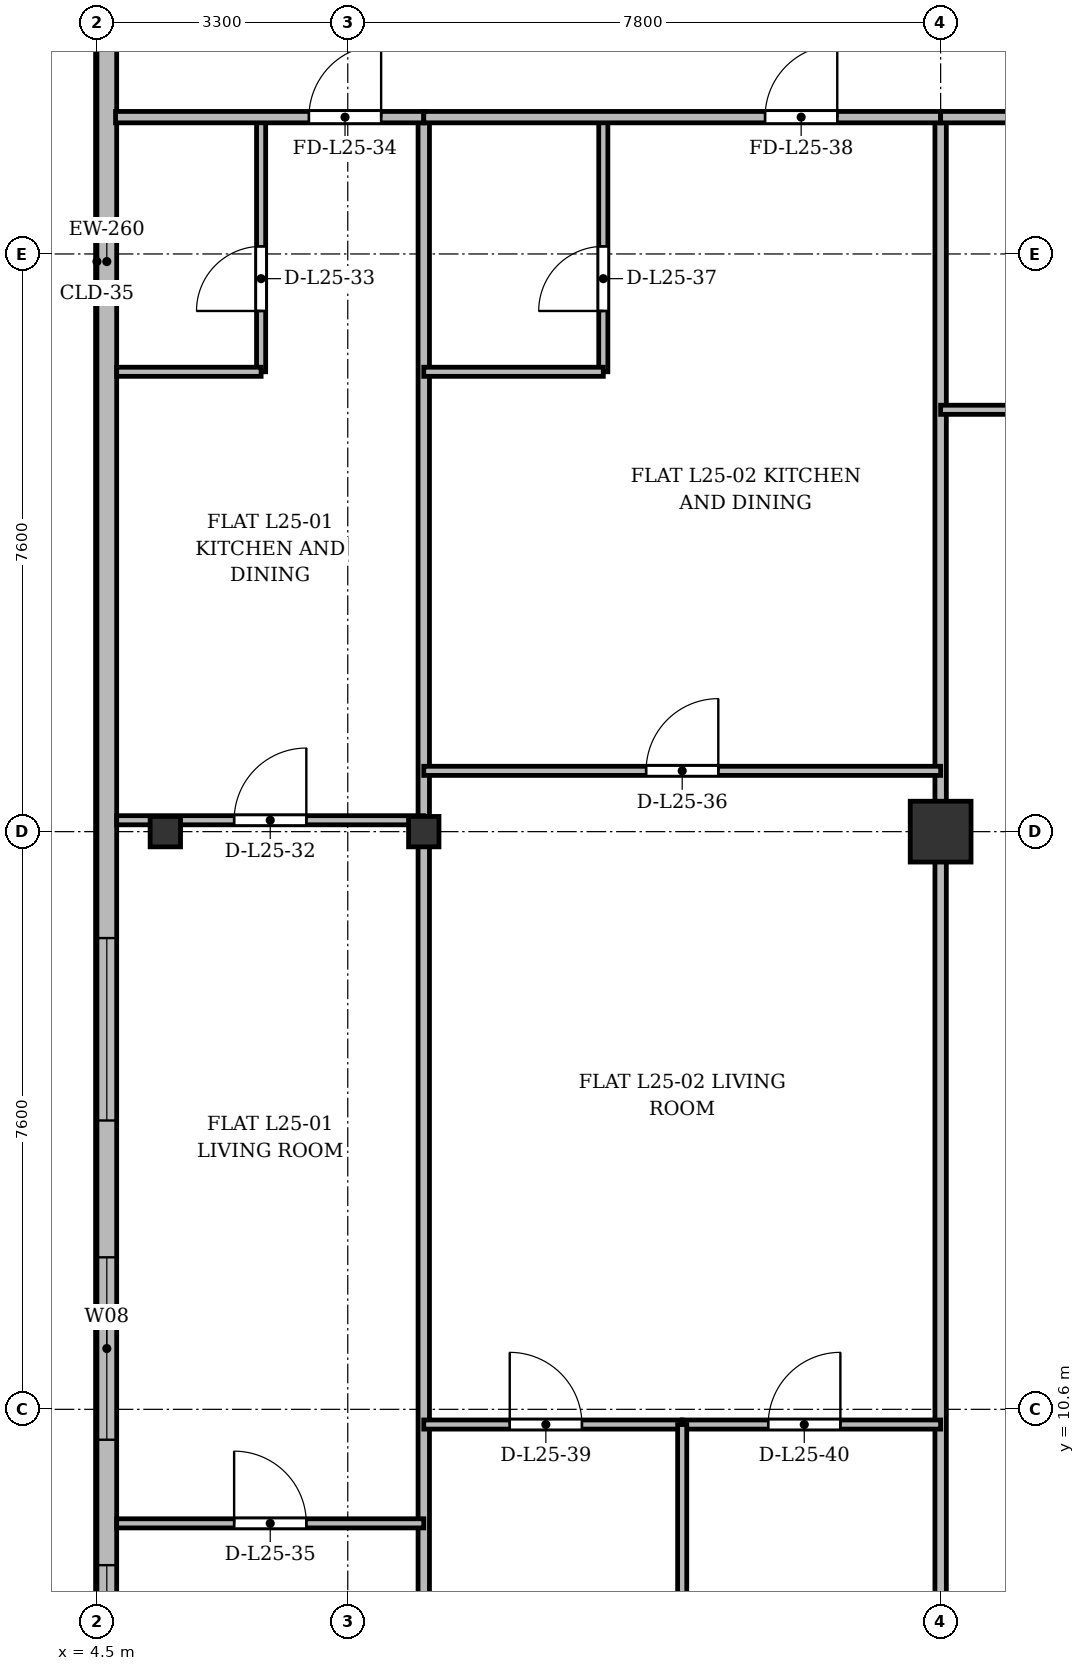
"""IFC4 building model, lengths in metres.
Left out: names, types, materials, properties, quantities, classifications, styles, units other than length and angle.
Written with IfcOpenShell. Run it as: python <this file> out.ifc"""

import sys

from ifc_helpers import new_model, si_unit, direction, frame, frame_2d, origin, origin_2d, place, context, subcontext, project, spatial, rectangle, i_section, extrude, source, transform, mapped, element, fill, save


model = new_model("IFC4")
c1 = context("Model", 3, precision=1e-05, world=origin(), true_north=direction((0.0, 1.0)))
c2 = subcontext(c1, "Body", "Model", "MODEL_VIEW")
j1 = project(units=[si_unit("LENGTHUNIT", "METRE"), si_unit("PLANEANGLEUNIT", "RADIAN")], contexts=[c1])
p1 = place(None, origin())
s1 = spatial("IfcSite", under=j1, at=p1, CompositionType="ELEMENT")
p2 = place(p1, origin())
s2 = spatial("IfcBuilding", under=s1, at=p2, CompositionType="ELEMENT")
p3 = place(p2, frame((0.0, 0.0, 99.7)))
s3 = spatial("IfcBuildingStorey", under=s2, at=p3, CompositionType="ELEMENT", Elevation=99.7)
m1 = source(origin(), c2, "Body", "SweptSolid", [
    extrude(i_section(OverallWidth=0.4, OverallDepth=0.4, WebThickness=0.022, FlangeThickness=0.035, at=origin_2d()), origin(), (0.0, 0.0, 1.0), 3.6),
])
for number, where, z_axis, x_axis in (
    (1, (5.4, 18.2, 0.0), (0.0, 0.0, 1.0), (1.0, 0.0, 0.0)),
    (2, (8.8, 18.2, 0.0), (0.0, 0.0, 1.0), (1.0, 0.0, 0.0)),
):
    element("IfcColumn", number, at=place(p3, frame(where, z_axis=z_axis, x_axis=x_axis)), inside=s3, PredefinedType="COLUMN", context=c2, shape_type="MappedRepresentation", body=[
        mapped(m1, transform((0.0, 0.0, 0.0), x_axis=(1.0, 0.0, 0.0), y_axis=(0.0, 1.0, 0.0), z_axis=(0.0, 0.0, 1.0), scale=1.0)),
    ])
m2 = source(origin(), c2, "Body", "SweptSolid", [
    extrude(rectangle(XDim=0.8, YDim=0.8, at=origin_2d()), origin(), (0.0, 0.0, 1.0), 3.6),
])
p4 = place(p3, frame((15.6, 18.2, 0.0), z_axis=(0.0, 0.0, 1.0), x_axis=(1.0, 0.0, 0.0)))
e3 = element("IfcColumn", 3, at=p4, inside=s3, PredefinedType="COLUMN", context=c2, shape_type="MappedRepresentation", body=[
    mapped(m2, transform((0.0, 0.0, 0.0), x_axis=(1.0, 0.0, 0.0), y_axis=(0.0, 1.0, 0.0), z_axis=(0.0, 0.0, 1.0), scale=1.0)),
])
p5 = place(p3, frame((4.63, 5.9, 0.0), z_axis=(0.0, 0.0, 1.0), x_axis=(0.0, 1.0, 0.0)))
e4 = element("IfcWall", 4, at=p5, inside=s3, PredefinedType="SOLIDWALL", context=c2, shape_type="SweptSolid", body=[
    extrude(rectangle(XDim=39.6, YDim=0.26, at=frame_2d((19.8, 0.0))), origin(), (0.0, 0.0, 1.0), 3.34),
])
p6 = place(p5, frame((1.45, 0.0, 0.92)))
e5 = element("IfcOpeningElement", 5, at=p6, cuts=e4, PredefinedType="OPENING", context=c2, shape_type="SweptSolid", body=[
    extrude(rectangle(XDim=1.2, YDim=1.65, at=frame_2d((0.6, 0.825))), frame((0.0, 0.14, 0.0), z_axis=(0.0, -1.0, 0.0), x_axis=(1.0, 0.0, 0.0)), (0.0, 0.0, 1.0), 0.28),
])
p7 = place(p5, frame((4.3, 0.0, 0.92)))
e6 = element("IfcOpeningElement", 6, at=p7, cuts=e4, PredefinedType="OPENING", context=c2, shape_type="SweptSolid", body=[
    extrude(rectangle(XDim=2.4, YDim=2.1, at=frame_2d((1.2, 1.05))), frame((0.0, 0.14, 0.0), z_axis=(0.0, -1.0, 0.0), x_axis=(1.0, 0.0, 0.0)), (0.0, 0.0, 1.0), 0.28),
])
p8 = place(p5, frame((8.5, 0.0, 0.92)))
e7 = element("IfcOpeningElement", 7, at=p8, cuts=e4, PredefinedType="OPENING", context=c2, shape_type="SweptSolid", body=[
    extrude(rectangle(XDim=2.4, YDim=2.1, at=frame_2d((1.2, 1.05))), frame((0.0, 0.14, 0.0), z_axis=(0.0, -1.0, 0.0), x_axis=(1.0, 0.0, 0.0)), (0.0, 0.0, 1.0), 0.28),
])
p9 = place(p5, frame((33.9, 0.0, 0.92)))
e8 = element("IfcOpeningElement", 8, at=p9, cuts=e4, PredefinedType="OPENING", context=c2, shape_type="SweptSolid", body=[
    extrude(rectangle(XDim=1.2, YDim=1.65, at=frame_2d((0.6, 0.825))), frame((0.0, 0.14, 0.0), z_axis=(0.0, -1.0, 0.0), x_axis=(1.0, 0.0, 0.0)), (0.0, 0.0, 1.0), 0.28),
])
p10 = place(p5, frame((37.25, 0.0, 0.92)))
e9 = element("IfcOpeningElement", 9, at=p10, cuts=e4, PredefinedType="OPENING", context=c2, shape_type="SweptSolid", body=[
    extrude(rectangle(XDim=1.2, YDim=1.65, at=frame_2d((0.6, 0.825))), frame((0.0, 0.14, 0.0), z_axis=(0.0, -1.0, 0.0), x_axis=(1.0, 0.0, 0.0)), (0.0, 0.0, 1.0), 0.28),
])
for number, where, z_axis, x_axis in (
    (10, (8.8, 3.145, 0.0), (0.0, 0.0, 1.0), (0.0, 1.0, 0.0)),
    (11, (15.6, 3.145, 0.0), (0.0, 0.0, 1.0), (0.0, 1.0, 0.0)),
):
    element("IfcWall", number, at=place(p3, frame(where, z_axis=z_axis, x_axis=x_axis)), inside=s3, PredefinedType="PARTITIONING", context=c2, shape_type="SweptSolid", body=[
        extrude(rectangle(XDim=24.455, YDim=0.15, at=frame_2d((12.228, 0.0))), origin(), (0.0, 0.0, 1.0), 2.84),
    ])
p11 = place(p3, frame((4.76, 18.35, 0.0), z_axis=(0.0, 0.0, 1.0), x_axis=(1.0, 0.0, 0.0)))
e12 = element("IfcWall", 12, at=p11, inside=s3, PredefinedType="PARTITIONING", context=c2, shape_type="SweptSolid", body=[
    extrude(rectangle(XDim=4.04, YDim=0.12, at=frame_2d((2.02, 0.0))), origin(), (0.0, 0.0, 1.0), 2.752),
])
p12 = place(p11, frame((1.545, 0.0, 0.0)))
e13 = element("IfcOpeningElement", 13, at=p12, cuts=e12, PredefinedType="OPENING", context=c2, shape_type="SweptSolid", body=[
    extrude(rectangle(XDim=0.95, YDim=2.15, at=frame_2d((0.475, 1.075))), frame((0.0, 0.07, 0.0), z_axis=(0.0, -1.0, 0.0), x_axis=(1.0, 0.0, 0.0)), (0.0, 0.0, 1.0), 0.14),
])
p13 = place(p3, frame((6.66, 24.25, 0.0), z_axis=(0.0, 0.0, 1.0), x_axis=(0.0, 1.0, 0.0)))
e14 = element("IfcWall", 14, at=p13, inside=s3, PredefinedType="PARTITIONING", context=c2, shape_type="SweptSolid", body=[
    extrude(rectangle(XDim=3.35, YDim=0.12, at=frame_2d((1.675, 0.0))), origin(), (0.0, 0.0, 1.0), 2.99),
])
p14 = place(p13, frame((0.8, 0.0, 0.0)))
e15 = element("IfcOpeningElement", 15, at=p14, cuts=e14, PredefinedType="OPENING", context=c2, shape_type="SweptSolid", body=[
    extrude(rectangle(XDim=0.85, YDim=2.1, at=frame_2d((0.425, 1.05))), frame((0.0, 0.07, 0.0), z_axis=(0.0, -1.0, 0.0), x_axis=(1.0, 0.0, 0.0)), (0.0, 0.0, 1.0), 0.14),
])
p15 = place(p3, frame((4.76, 24.25, 0.0), z_axis=(0.0, 0.0, 1.0), x_axis=(1.0, 0.0, 0.0)))
e16 = element("IfcWall", 16, at=p15, inside=s3, PredefinedType="PARTITIONING", context=c2, shape_type="SweptSolid", body=[
    extrude(rectangle(XDim=1.9, YDim=0.12, at=frame_2d((0.95, 0.0))), origin(), (0.0, 0.0, 1.0), 2.84),
])
p16 = place(p3, frame((4.745, 27.6, 0.0), z_axis=(0.0, 0.0, 1.0), x_axis=(1.0, 0.0, 0.0)))
e17 = element("IfcWall", 17, at=p16, inside=s3, PredefinedType="PARTITIONING", context=c2, shape_type="SweptSolid", body=[
    extrude(rectangle(XDim=4.055, YDim=0.15, at=frame_2d((2.027, 0.0))), origin(), (0.0, 0.0, 1.0), 2.84),
])
p17 = place(p16, frame((2.544, 0.0, 0.0)))
e18 = element("IfcOpeningElement", 18, at=p17, cuts=e17, PredefinedType="OPENING", context=c2, shape_type="SweptSolid", body=[
    extrude(rectangle(XDim=0.95, YDim=2.15, at=frame_2d((0.475, 1.075))), frame((0.0, 0.085, 0.0), z_axis=(0.0, -1.0, 0.0), x_axis=(1.0, 0.0, 0.0)), (0.0, 0.0, 1.0), 0.17),
])
p18 = place(p3, frame((4.76, 9.1, 0.0), z_axis=(0.0, 0.0, 1.0), x_axis=(1.0, 0.0, 0.0)))
e19 = element("IfcWall", 19, at=p18, inside=s3, PredefinedType="PARTITIONING", context=c2, shape_type="SweptSolid", body=[
    extrude(rectangle(XDim=4.04, YDim=0.12, at=frame_2d((2.02, 0.0))), origin(), (0.0, 0.0, 1.0), 2.84),
])
p19 = place(p18, frame((1.545, 0.0, 0.0)))
e20 = element("IfcOpeningElement", 20, at=p19, cuts=e19, PredefinedType="OPENING", context=c2, shape_type="SweptSolid", body=[
    extrude(rectangle(XDim=0.95, YDim=2.15, at=frame_2d((0.475, 1.075))), frame((0.0, 0.07, 0.0), z_axis=(0.0, -1.0, 0.0), x_axis=(1.0, 0.0, 0.0)), (0.0, 0.0, 1.0), 0.14),
])
p20 = place(p3, frame((8.8, 19.0, 0.0), z_axis=(0.0, 0.0, 1.0), x_axis=(1.0, 0.0, 0.0)))
e21 = element("IfcWall", 21, at=p20, inside=s3, PredefinedType="PARTITIONING", context=c2, shape_type="SweptSolid", body=[
    extrude(rectangle(XDim=6.8, YDim=0.12, at=frame_2d((3.4, 0.0))), origin(), (0.0, 0.0, 1.0), 2.84),
])
p21 = place(p20, frame((2.925, 0.0, 0.0)))
e22 = element("IfcOpeningElement", 22, at=p21, cuts=e21, PredefinedType="OPENING", context=c2, shape_type="SweptSolid", body=[
    extrude(rectangle(XDim=0.95, YDim=2.15, at=frame_2d((0.475, 1.075))), frame((0.0, 0.07, 0.0), z_axis=(0.0, -1.0, 0.0), x_axis=(1.0, 0.0, 0.0)), (0.0, 0.0, 1.0), 0.14),
])
p22 = place(p3, frame((11.162, 24.25, 0.0), z_axis=(0.0, 0.0, 1.0), x_axis=(0.0, 1.0, 0.0)))
e23 = element("IfcWall", 23, at=p22, inside=s3, PredefinedType="PARTITIONING", context=c2, shape_type="SweptSolid", body=[
    extrude(rectangle(XDim=3.35, YDim=0.12, at=frame_2d((1.675, 0.0))), origin(), (0.0, 0.0, 1.0), 2.99),
])
p23 = place(p22, frame((0.8, 0.0, 0.0)))
e24 = element("IfcOpeningElement", 24, at=p23, cuts=e23, PredefinedType="OPENING", context=c2, shape_type="SweptSolid", body=[
    extrude(rectangle(XDim=0.85, YDim=2.1, at=frame_2d((0.425, 1.05))), frame((0.0, 0.07, 0.0), z_axis=(0.0, -1.0, 0.0), x_axis=(1.0, 0.0, 0.0)), (0.0, 0.0, 1.0), 0.14),
])
p24 = place(p3, frame((8.8, 24.25, 0.0), z_axis=(0.0, 0.0, 1.0), x_axis=(1.0, 0.0, 0.0)))
e25 = element("IfcWall", 25, at=p24, inside=s3, PredefinedType="PARTITIONING", context=c2, shape_type="SweptSolid", body=[
    extrude(rectangle(XDim=2.362, YDim=0.12, at=frame_2d((1.181, 0.0))), origin(), (0.0, 0.0, 1.0), 2.84),
])
p25 = place(p3, frame((8.8, 27.6, 0.0), z_axis=(0.0, 0.0, 1.0), x_axis=(1.0, 0.0, 0.0)))
e26 = element("IfcWall", 26, at=p25, inside=s3, PredefinedType="PARTITIONING", context=c2, shape_type="SweptSolid", body=[
    extrude(rectangle(XDim=6.8, YDim=0.15, at=frame_2d((3.4, 0.0))), origin(), (0.0, 0.0, 1.0), 2.84),
])
p26 = place(p25, frame((4.49, 0.0, 0.0)))
e27 = element("IfcOpeningElement", 27, at=p26, cuts=e26, PredefinedType="OPENING", context=c2, shape_type="SweptSolid", body=[
    extrude(rectangle(XDim=0.95, YDim=2.15, at=frame_2d((0.475, 1.075))), frame((0.0, 0.085, 0.0), z_axis=(0.0, -1.0, 0.0), x_axis=(1.0, 0.0, 0.0)), (0.0, 0.0, 1.0), 0.17),
])
p27 = place(p3, frame((8.8, 10.4, 0.0), z_axis=(0.0, 0.0, 1.0), x_axis=(1.0, 0.0, 0.0)))
e28 = element("IfcWall", 28, at=p27, inside=s3, PredefinedType="PARTITIONING", context=c2, shape_type="SweptSolid", body=[
    extrude(rectangle(XDim=3.4, YDim=0.12, at=frame_2d((1.7, 0.0))), origin(), (0.0, 0.0, 1.0), 2.84),
])
p28 = place(p27, frame((1.131, 0.0, 0.0)))
e29 = element("IfcOpeningElement", 29, at=p28, cuts=e28, PredefinedType="OPENING", context=c2, shape_type="SweptSolid", body=[
    extrude(rectangle(XDim=0.95, YDim=2.15, at=frame_2d((0.475, 1.075))), frame((0.0, 0.07, 0.0), z_axis=(0.0, -1.0, 0.0), x_axis=(1.0, 0.0, 0.0)), (0.0, 0.0, 1.0), 0.14),
])
p29 = place(p3, frame((12.2, 10.4, 0.0), z_axis=(0.0, 0.0, 1.0), x_axis=(1.0, 0.0, 0.0)))
e30 = element("IfcWall", 30, at=p29, inside=s3, PredefinedType="PARTITIONING", context=c2, shape_type="SweptSolid", body=[
    extrude(rectangle(XDim=3.4, YDim=0.12, at=frame_2d((1.7, 0.0))), origin(), (0.0, 0.0, 1.0), 2.84),
])
p30 = place(p29, frame((1.131, 0.0, 0.0)))
e31 = element("IfcOpeningElement", 31, at=p30, cuts=e30, PredefinedType="OPENING", context=c2, shape_type="SweptSolid", body=[
    extrude(rectangle(XDim=0.95, YDim=2.15, at=frame_2d((0.475, 1.075))), frame((0.0, 0.07, 0.0), z_axis=(0.0, -1.0, 0.0), x_axis=(1.0, 0.0, 0.0)), (0.0, 0.0, 1.0), 0.14),
])
p31 = place(p3, frame((12.2, 3.145, 0.0), z_axis=(0.0, 0.0, 1.0), x_axis=(0.0, 1.0, 0.0)))
e32 = element("IfcWall", 32, at=p31, inside=s3, PredefinedType="PARTITIONING", context=c2, shape_type="SweptSolid", body=[
    extrude(rectangle(XDim=7.255, YDim=0.12, at=frame_2d((3.627, 0.0))), origin(), (0.0, 0.0, 1.0), 2.752),
])
p32 = place(p3, frame((15.6, 27.6, 0.0), z_axis=(0.0, 0.0, 1.0), x_axis=(1.0, 0.0, 0.0)))
e33 = element("IfcWall", 33, at=p32, inside=s3, PredefinedType="PARTITIONING", context=c2, shape_type="SweptSolid", body=[
    extrude(rectangle(XDim=4.0, YDim=0.15, at=frame_2d((2.0, 0.0))), origin(), (0.0, 0.0, 1.0), 2.84),
])
p33 = place(p32, frame((1.525, 0.0, 0.0)))
e34 = element("IfcOpeningElement", 34, at=p33, cuts=e33, PredefinedType="OPENING", context=c2, shape_type="SweptSolid", body=[
    extrude(rectangle(XDim=0.95, YDim=2.15, at=frame_2d((0.475, 1.075))), frame((0.0, 0.085, 0.0), z_axis=(0.0, -1.0, 0.0), x_axis=(1.0, 0.0, 0.0)), (0.0, 0.0, 1.0), 0.17),
])
p34 = place(p3, frame((15.6, 23.75, 0.0), z_axis=(0.0, 0.0, 1.0), x_axis=(1.0, 0.0, 0.0)))
e35 = element("IfcWall", 35, at=p34, inside=s3, PredefinedType="PARTITIONING", context=c2, shape_type="SweptSolid", body=[
    extrude(rectangle(XDim=4.0, YDim=0.12, at=frame_2d((2.0, 0.0))), origin(), (0.0, 0.0, 1.0), 2.84),
])
p35 = place(p34, frame((1.525, 0.0, 0.0)))
e36 = element("IfcOpeningElement", 36, at=p35, cuts=e35, PredefinedType="OPENING", context=c2, shape_type="SweptSolid", body=[
    extrude(rectangle(XDim=0.95, YDim=2.15, at=frame_2d((0.475, 1.075))), frame((0.0, 0.07, 0.0), z_axis=(0.0, -1.0, 0.0), x_axis=(1.0, 0.0, 0.0)), (0.0, 0.0, 1.0), 0.14),
])
m3 = source(origin(), c2, "Body", "SweptSolid", [
    extrude(rectangle(XDim=1.2, YDim=1.65, at=frame_2d((0.6, 0.825))), frame((0.0, 0.03, 0.0), z_axis=(0.0, -1.0, 0.0), x_axis=(1.0, 0.0, 0.0)), (0.0, 0.0, 1.0), 0.06),
])
p36 = place(p6, origin())
e37 = element("IfcWindow", 37, at=p36, inside=s3, PartitioningType="SINGLE_PANEL", PredefinedType="WINDOW", context=c2, shape_type="MappedRepresentation", body=[
    mapped(m3, transform((0.0, 0.0, 0.0), x_axis=(1.0, 0.0, 0.0), y_axis=(0.0, 1.0, 0.0), z_axis=(0.0, 0.0, 1.0), scale=1.0)),
])
fill(e5, e37)
m4 = source(origin(), c2, "Body", "SweptSolid", [
    extrude(rectangle(XDim=2.4, YDim=2.1, at=frame_2d((1.2, 1.05))), frame((0.0, 0.03, 0.0), z_axis=(0.0, -1.0, 0.0), x_axis=(1.0, 0.0, 0.0)), (0.0, 0.0, 1.0), 0.06),
])
p37 = place(p7, origin())
e38 = element("IfcWindow", 38, at=p37, inside=s3, PartitioningType="SINGLE_PANEL", PredefinedType="WINDOW", context=c2, shape_type="MappedRepresentation", body=[
    mapped(m4, transform((0.0, 0.0, 0.0), x_axis=(1.0, 0.0, 0.0), y_axis=(0.0, 1.0, 0.0), z_axis=(0.0, 0.0, 1.0), scale=1.0)),
])
fill(e6, e38)
p38 = place(p8, origin())
e39 = element("IfcWindow", 39, at=p38, inside=s3, PartitioningType="SINGLE_PANEL", PredefinedType="WINDOW", context=c2, shape_type="MappedRepresentation", body=[
    mapped(m4, transform((0.0, 0.0, 0.0), x_axis=(1.0, 0.0, 0.0), y_axis=(0.0, 1.0, 0.0), z_axis=(0.0, 0.0, 1.0), scale=1.0)),
])
fill(e7, e39)
m5 = source(origin(), c2, "Body", "SweptSolid", [
    extrude(rectangle(XDim=0.95, YDim=2.15, at=frame_2d((0.475, 1.075))), frame((0.0, 0.025, 0.0), z_axis=(0.0, -1.0, 0.0), x_axis=(1.0, 0.0, 0.0)), (0.0, 0.0, 1.0), 0.05),
])
p39 = place(p12, origin())
e40 = element("IfcDoor", 40, at=p39, inside=s3, OperationType="SINGLE_SWING_RIGHT", PredefinedType="DOOR", context=c2, shape_type="MappedRepresentation", body=[
    mapped(m5, transform((0.0, 0.0, 0.0), x_axis=(1.0, 0.0, 0.0), y_axis=(0.0, 1.0, 0.0), z_axis=(0.0, 0.0, 1.0), scale=1.0)),
])
fill(e13, e40)
m6 = source(origin(), c2, "Body", "SweptSolid", [
    extrude(rectangle(XDim=0.85, YDim=2.1, at=frame_2d((0.425, 1.05))), frame((0.0, 0.025, 0.0), z_axis=(0.0, -1.0, 0.0), x_axis=(1.0, 0.0, 0.0)), (0.0, 0.0, 1.0), 0.05),
])
p40 = place(p14, origin())
e41 = element("IfcDoor", 41, at=p40, inside=s3, OperationType="SINGLE_SWING_LEFT", PredefinedType="DOOR", context=c2, shape_type="MappedRepresentation", body=[
    mapped(m6, transform((0.0, 0.0, 0.0), x_axis=(1.0, 0.0, 0.0), y_axis=(0.0, 1.0, 0.0), z_axis=(0.0, 0.0, 1.0), scale=1.0)),
])
fill(e15, e41)
p41 = place(p17, origin())
e42 = element("IfcDoor", 42, at=p41, inside=s3, OperationType="SINGLE_SWING_RIGHT", PredefinedType="DOOR", context=c2, shape_type="MappedRepresentation", body=[
    mapped(m5, transform((0.0, 0.0, 0.0), x_axis=(1.0, 0.0, 0.0), y_axis=(0.0, 1.0, 0.0), z_axis=(0.0, 0.0, 1.0), scale=1.0)),
])
fill(e18, e42)
p42 = place(p19, origin())
e43 = element("IfcDoor", 43, at=p42, inside=s3, OperationType="SINGLE_SWING_LEFT", PredefinedType="DOOR", context=c2, shape_type="MappedRepresentation", body=[
    mapped(m5, transform((0.0, 0.0, 0.0), x_axis=(1.0, 0.0, 0.0), y_axis=(0.0, 1.0, 0.0), z_axis=(0.0, 0.0, 1.0), scale=1.0)),
])
fill(e20, e43)
p43 = place(p21, origin())
e44 = element("IfcDoor", 44, at=p43, inside=s3, OperationType="SINGLE_SWING_RIGHT", PredefinedType="DOOR", context=c2, shape_type="MappedRepresentation", body=[
    mapped(m5, transform((0.0, 0.0, 0.0), x_axis=(1.0, 0.0, 0.0), y_axis=(0.0, 1.0, 0.0), z_axis=(0.0, 0.0, 1.0), scale=1.0)),
])
fill(e22, e44)
p44 = place(p23, origin())
e45 = element("IfcDoor", 45, at=p44, inside=s3, OperationType="SINGLE_SWING_LEFT", PredefinedType="DOOR", context=c2, shape_type="MappedRepresentation", body=[
    mapped(m6, transform((0.0, 0.0, 0.0), x_axis=(1.0, 0.0, 0.0), y_axis=(0.0, 1.0, 0.0), z_axis=(0.0, 0.0, 1.0), scale=1.0)),
])
fill(e24, e45)
p45 = place(p26, origin())
e46 = element("IfcDoor", 46, at=p45, inside=s3, OperationType="SINGLE_SWING_RIGHT", PredefinedType="DOOR", context=c2, shape_type="MappedRepresentation", body=[
    mapped(m5, transform((0.0, 0.0, 0.0), x_axis=(1.0, 0.0, 0.0), y_axis=(0.0, 1.0, 0.0), z_axis=(0.0, 0.0, 1.0), scale=1.0)),
])
fill(e27, e46)
p46 = place(p28, origin())
e47 = element("IfcDoor", 47, at=p46, inside=s3, OperationType="SINGLE_SWING_LEFT", PredefinedType="DOOR", context=c2, shape_type="MappedRepresentation", body=[
    mapped(m5, transform((0.0, 0.0, 0.0), x_axis=(1.0, 0.0, 0.0), y_axis=(0.0, 1.0, 0.0), z_axis=(0.0, 0.0, 1.0), scale=1.0)),
])
fill(e29, e47)
p47 = place(p30, origin())
e48 = element("IfcDoor", 48, at=p47, inside=s3, OperationType="SINGLE_SWING_RIGHT", PredefinedType="DOOR", context=c2, shape_type="MappedRepresentation", body=[
    mapped(m5, transform((0.0, 0.0, 0.0), x_axis=(1.0, 0.0, 0.0), y_axis=(0.0, 1.0, 0.0), z_axis=(0.0, 0.0, 1.0), scale=1.0)),
])
fill(e31, e48)
save(model, sys.argv[1])
